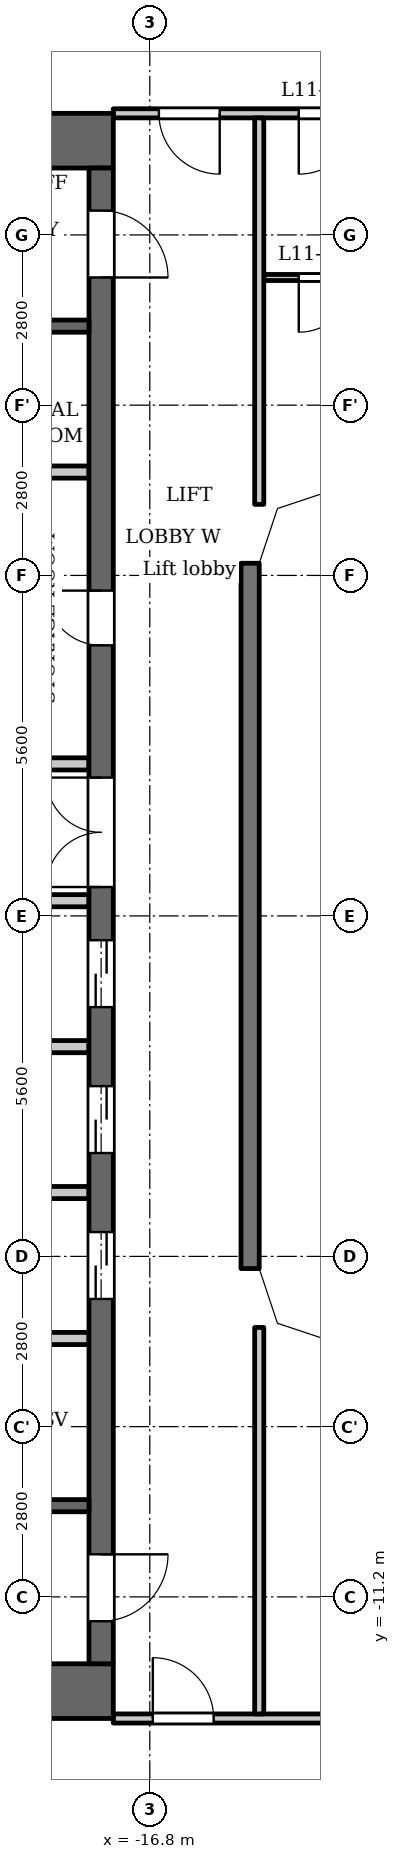
"""IFC4 building model, lengths in metres.
Left out: names, types, materials, properties, quantities, classifications, styles, units other than length and angle.
Written with IfcOpenShell. Run it as: python <this file> out.ifc"""

import sys

from ifc_helpers import new_model, si_unit, direction, frame, frame_2d, origin, place, context, subcontext, project, spatial, polyline, rectangle, outline, extrude, element, fill, save


model = new_model("IFC4")
c1 = context("Model", 3, precision=1e-05, world=origin(), true_north=direction((0.0, 1.0)))
c2 = subcontext(c1, "Body", "Model", "MODEL_VIEW")
j1 = project(units=[si_unit("LENGTHUNIT", "METRE"), si_unit("PLANEANGLEUNIT", "RADIAN")], contexts=[c1])
p1 = place(None, origin())
s1 = spatial("IfcSite", under=j1, at=p1, CompositionType="ELEMENT")
p2 = place(p1, origin())
s2 = spatial("IfcBuilding", under=s1, at=p2, CompositionType="ELEMENT")
p3 = place(p2, frame((0.0, 0.0, 48.0)))
s3 = spatial("IfcBuildingStorey", under=s2, at=p3, CompositionType="ELEMENT", Elevation=48.0)
p4 = place(p3, frame((-15.15, -5.8, 0.0), z_axis=(0.0, 0.0, 1.0), x_axis=(0.0, 1.0, 0.0)))
e1 = element("IfcWall", 1, at=p4, inside=s3, PredefinedType="SOLIDWALL", context=c2, shape_type="SweptSolid", body=[
    extrude(rectangle(XDim=11.6, YDim=0.3, at=frame_2d((5.8, 0.0))), origin(), (0.0, 0.0, 1.0), 3.2),
])
for number, where, z_axis, x_axis in (
    (2, (-17.4, 12.75, 0.0), (0.0, 0.0, 1.0), (-1.0, 0.0, 0.0)),
    (3, (-17.4, -12.75, 0.0), (0.0, 0.0, 1.0), (-1.0, 0.0, 0.0)),
):
    element("IfcWall", number, at=place(p3, frame(where, z_axis=z_axis, x_axis=x_axis)), inside=s3, PredefinedType="SHEAR", context=c2, shape_type="SweptSolid", body=[
        extrude(rectangle(XDim=10.4, YDim=0.9, at=frame_2d((5.2, 0.0))), origin(), (0.0, 0.0, 1.0), 3.2),
    ])
p5 = place(p3, frame((-17.6, -12.3, 0.0), z_axis=(0.0, 0.0, 1.0), x_axis=(0.0, 1.0, 0.0)))
e4 = element("IfcWall", 4, at=p5, inside=s3, PredefinedType="SHEAR", context=c2, shape_type="SweptSolid", body=[
    extrude(rectangle(XDim=24.6, YDim=0.4, at=frame_2d((12.3, 0.0))), origin(), (0.0, 0.0, 1.0), 3.2),
])
p6 = place(p5, frame((6.0, 0.0, 0.0)))
e5 = element("IfcOpeningElement", 5, at=p6, cuts=e4, PredefinedType="OPENING", context=c2, shape_type="SweptSolid", body=[
    extrude(rectangle(XDim=1.1, YDim=2.1, at=frame_2d((0.55, 1.05))), frame((0.0, 0.21, 0.0), z_axis=(0.0, -1.0, 0.0), x_axis=(1.0, 0.0, 0.0)), (0.0, 0.0, 1.0), 0.42),
])
p7 = place(p5, frame((8.4, 0.0, 0.0)))
e6 = element("IfcOpeningElement", 6, at=p7, cuts=e4, PredefinedType="OPENING", context=c2, shape_type="SweptSolid", body=[
    extrude(rectangle(XDim=1.1, YDim=2.1, at=frame_2d((0.55, 1.05))), frame((0.0, 0.21, 0.0), z_axis=(0.0, -1.0, 0.0), x_axis=(1.0, 0.0, 0.0)), (0.0, 0.0, 1.0), 0.42),
])
p8 = place(p5, frame((10.8, 0.0, 0.0)))
e7 = element("IfcOpeningElement", 7, at=p8, cuts=e4, PredefinedType="OPENING", context=c2, shape_type="SweptSolid", body=[
    extrude(rectangle(XDim=1.1, YDim=2.1, at=frame_2d((0.55, 1.05))), frame((0.0, 0.21, 0.0), z_axis=(0.0, -1.0, 0.0), x_axis=(1.0, 0.0, 0.0)), (0.0, 0.0, 1.0), 0.42),
])
p9 = place(p5, frame((16.75, 0.0, 0.0)))
e8 = element("IfcOpeningElement", 8, at=p9, cuts=e4, PredefinedType="OPENING", context=c2, shape_type="SweptSolid", body=[
    extrude(rectangle(XDim=0.9, YDim=2.1, at=frame_2d((0.45, 1.05))), frame((0.0, 0.21, 0.0), z_axis=(0.0, -1.0, 0.0), x_axis=(1.0, 0.0, 0.0)), (0.0, 0.0, 1.0), 0.42),
])
p10 = place(p5, frame((22.8, 0.0, 0.0)))
e9 = element("IfcOpeningElement", 9, at=p10, cuts=e4, PredefinedType="OPENING", context=c2, shape_type="SweptSolid", body=[
    extrude(rectangle(XDim=1.1, YDim=2.1, at=frame_2d((0.55, 1.05))), frame((0.0, 0.21, 0.0), z_axis=(0.0, -1.0, 0.0), x_axis=(1.0, 0.0, 0.0)), (0.0, 0.0, 1.0), 0.42),
])
p11 = place(p5, frame((0.7, 0.0, 0.0)))
e10 = element("IfcOpeningElement", 10, at=p11, cuts=e4, PredefinedType="OPENING", context=c2, shape_type="SweptSolid", body=[
    extrude(rectangle(XDim=1.1, YDim=2.1, at=frame_2d((0.55, 1.05))), frame((0.0, 0.21, 0.0), z_axis=(0.0, -1.0, 0.0), x_axis=(1.0, 0.0, 0.0)), (0.0, 0.0, 1.0), 0.42),
])
p12 = place(p5, frame((12.775, 0.0, 0.0)))
e11 = element("IfcOpeningElement", 11, at=p12, cuts=e4, PredefinedType="OPENING", context=c2, shape_type="SweptSolid", body=[
    extrude(rectangle(XDim=1.8, YDim=2.1, at=frame_2d((0.9, 1.05))), frame((0.0, 0.21, 0.0), z_axis=(0.0, -1.0, 0.0), x_axis=(1.0, 0.0, 0.0)), (0.0, 0.0, 1.0), 0.42),
])
p13 = place(p3, frame((-17.8, -9.7, 0.0), z_axis=(0.0, 0.0, 1.0), x_axis=(-1.0, 0.0, 0.0)))
e12 = element("IfcWall", 12, at=p13, inside=s3, PredefinedType="SHEAR", context=c2, shape_type="SweptSolid", body=[
    extrude(rectangle(XDim=8.3, YDim=0.2, at=frame_2d((4.15, 0.0))), origin(), (0.0, 0.0, 1.0), 3.2),
])
p14 = place(p13, frame((0.85, 0.0, 0.0)))
e13 = element("IfcOpeningElement", 13, at=p14, cuts=e12, PredefinedType="OPENING", context=c2, shape_type="SweptSolid", body=[
    extrude(rectangle(XDim=1.1, YDim=2.1, at=frame_2d((0.55, 1.05))), frame((0.0, 0.11, 0.0), z_axis=(0.0, -1.0, 0.0), x_axis=(1.0, 0.0, 0.0)), (0.0, 0.0, 1.0), 0.22),
])
p15 = place(p13, frame((3.75, 0.0, 0.0)))
e14 = element("IfcOpeningElement", 14, at=p15, cuts=e12, PredefinedType="OPENING", context=c2, shape_type="SweptSolid", body=[
    extrude(rectangle(XDim=1.1, YDim=2.1, at=frame_2d((0.55, 1.05))), frame((0.0, 0.11, 0.0), z_axis=(0.0, -1.0, 0.0), x_axis=(1.0, 0.0, 0.0)), (0.0, 0.0, 1.0), 0.22),
])
for number, where, z_axis, x_axis in (
    (15, (-17.8, -6.95, 0.0), (0.0, 0.0, 1.0), (-1.0, 0.0, 0.0)),
    (16, (-17.8, -4.55, 0.0), (0.0, 0.0, 1.0), (-1.0, 0.0, 0.0)),
    (17, (-17.8, -2.15, 0.0), (0.0, 0.0, 1.0), (-1.0, 0.0, 0.0)),
):
    element("IfcWall", number, at=place(p3, frame(where, z_axis=z_axis, x_axis=x_axis)), inside=s3, PredefinedType="PARTITIONING", context=c2, shape_type="SweptSolid", body=[
        extrude(rectangle(XDim=2.8, YDim=0.2, at=frame_2d((1.4, 0.0))), origin(), (0.0, 0.0, 1.0), 3.2),
    ])
p16 = place(p3, frame((-17.8, 0.25, 0.0), z_axis=(0.0, 0.0, 1.0), x_axis=(-1.0, 0.0, 0.0)))
e18 = element("IfcWall", 18, at=p16, inside=s3, PredefinedType="PARTITIONING", context=c2, shape_type="SweptSolid", body=[
    extrude(rectangle(XDim=3.0, YDim=0.2, at=frame_2d((1.5, 0.0))), origin(), (0.0, 0.0, 1.0), 3.2),
])
p17 = place(p3, frame((-17.8, 2.5, 0.0), z_axis=(0.0, 0.0, 1.0), x_axis=(-1.0, 0.0, 0.0)))
e19 = element("IfcWall", 19, at=p17, inside=s3, PredefinedType="PARTITIONING", context=c2, shape_type="SweptSolid", body=[
    extrude(rectangle(XDim=3.0, YDim=0.2, at=frame_2d((1.5, 0.0))), origin(), (0.0, 0.0, 1.0), 3.2),
])
p18 = place(p17, frame((1.7, 0.0, 0.0)))
e20 = element("IfcOpeningElement", 20, at=p18, cuts=e19, PredefinedType="OPENING", context=c2, shape_type="SweptSolid", body=[
    extrude(rectangle(XDim=0.9, YDim=2.1, at=frame_2d((0.45, 1.05))), frame((0.0, 0.11, 0.0), z_axis=(0.0, -1.0, 0.0), x_axis=(1.0, 0.0, 0.0)), (0.0, 0.0, 1.0), 0.22),
])
p19 = place(p3, frame((-17.8, 7.3, 0.0), z_axis=(0.0, 0.0, 1.0), x_axis=(-1.0, 0.0, 0.0)))
e21 = element("IfcWall", 21, at=p19, inside=s3, PredefinedType="PARTITIONING", context=c2, shape_type="SweptSolid", body=[
    extrude(rectangle(XDim=2.8, YDim=0.2, at=frame_2d((1.4, 0.0))), origin(), (0.0, 0.0, 1.0), 3.2),
])
p20 = place(p3, frame((-17.8, 9.7, 0.0), z_axis=(0.0, 0.0, 1.0), x_axis=(-1.0, 0.0, 0.0)))
e22 = element("IfcWall", 22, at=p20, inside=s3, PredefinedType="SHEAR", context=c2, shape_type="SweptSolid", body=[
    extrude(rectangle(XDim=8.3, YDim=0.2, at=frame_2d((4.15, 0.0))), origin(), (0.0, 0.0, 1.0), 3.2),
])
p21 = place(p20, frame((0.85, 0.0, 0.0)))
e23 = element("IfcOpeningElement", 23, at=p21, cuts=e22, PredefinedType="OPENING", context=c2, shape_type="SweptSolid", body=[
    extrude(rectangle(XDim=1.1, YDim=2.1, at=frame_2d((0.55, 1.05))), frame((0.0, 0.11, 0.0), z_axis=(0.0, -1.0, 0.0), x_axis=(1.0, 0.0, 0.0)), (0.0, 0.0, 1.0), 0.22),
])
p22 = place(p20, frame((3.75, 0.0, 0.0)))
e24 = element("IfcOpeningElement", 24, at=p22, cuts=e22, PredefinedType="OPENING", context=c2, shape_type="SweptSolid", body=[
    extrude(rectangle(XDim=1.1, YDim=2.1, at=frame_2d((0.55, 1.05))), frame((0.0, 0.11, 0.0), z_axis=(0.0, -1.0, 0.0), x_axis=(1.0, 0.0, 0.0)), (0.0, 0.0, 1.0), 0.22),
])
p23 = place(p3, frame((-17.4, -13.2, 0.0), z_axis=(0.0, 0.0, 1.0), x_axis=(1.0, 0.0, 0.0)))
e25 = element("IfcWall", 25, at=p23, inside=s3, PredefinedType="PARTITIONING", context=c2, shape_type="SweptSolid", body=[
    extrude(rectangle(XDim=34.8, YDim=0.15, at=frame_2d((17.4, 0.0))), origin(), (0.0, 0.0, 1.0), 3.2),
])
p24 = place(p23, frame((0.65, 0.0, 0.0)))
e26 = element("IfcOpeningElement", 26, at=p24, cuts=e25, PredefinedType="OPENING", context=c2, shape_type="SweptSolid", body=[
    extrude(rectangle(XDim=1.0, YDim=2.1, at=frame_2d((0.5, 1.05))), frame((0.0, 0.085, 0.0), z_axis=(0.0, -1.0, 0.0), x_axis=(1.0, 0.0, 0.0)), (0.0, 0.0, 1.0), 0.17),
])
p25 = place(p23, frame((33.05, 0.0, 0.0)))
e27 = element("IfcOpeningElement", 27, at=p25, cuts=e25, PredefinedType="OPENING", context=c2, shape_type="SweptSolid", body=[
    extrude(rectangle(XDim=1.0, YDim=2.1, at=frame_2d((0.5, 1.05))), frame((0.0, 0.085, 0.0), z_axis=(0.0, -1.0, 0.0), x_axis=(1.0, 0.0, 0.0)), (0.0, 0.0, 1.0), 0.17),
])
p26 = place(p23, frame((4.55, 0.0, 0.0)))
e28 = element("IfcOpeningElement", 28, at=p26, cuts=e25, PredefinedType="OPENING", context=c2, shape_type="SweptSolid", body=[
    extrude(rectangle(XDim=1.0, YDim=2.1, at=frame_2d((0.5, 1.05))), frame((0.0, 0.085, 0.0), z_axis=(0.0, -1.0, 0.0), x_axis=(1.0, 0.0, 0.0)), (0.0, 0.0, 1.0), 0.17),
])
p27 = place(p23, frame((6.9, 0.0, 0.0)))
e29 = element("IfcOpeningElement", 29, at=p27, cuts=e25, PredefinedType="OPENING", context=c2, shape_type="SweptSolid", body=[
    extrude(rectangle(XDim=1.0, YDim=2.1, at=frame_2d((0.5, 1.05))), frame((0.0, 0.085, 0.0), z_axis=(0.0, -1.0, 0.0), x_axis=(1.0, 0.0, 0.0)), (0.0, 0.0, 1.0), 0.17),
])
p28 = place(p23, frame((15.75, 0.0, 0.0)))
e30 = element("IfcOpeningElement", 30, at=p28, cuts=e25, PredefinedType="OPENING", context=c2, shape_type="SweptSolid", body=[
    extrude(rectangle(XDim=1.0, YDim=2.1, at=frame_2d((0.5, 1.05))), frame((0.0, 0.085, 0.0), z_axis=(0.0, -1.0, 0.0), x_axis=(1.0, 0.0, 0.0)), (0.0, 0.0, 1.0), 0.17),
])
p29 = place(p23, frame((18.1, 0.0, 0.0)))
e31 = element("IfcOpeningElement", 31, at=p29, cuts=e25, PredefinedType="OPENING", context=c2, shape_type="SweptSolid", body=[
    extrude(rectangle(XDim=1.0, YDim=2.1, at=frame_2d((0.5, 1.05))), frame((0.0, 0.085, 0.0), z_axis=(0.0, -1.0, 0.0), x_axis=(1.0, 0.0, 0.0)), (0.0, 0.0, 1.0), 0.17),
])
p30 = place(p23, frame((26.95, 0.0, 0.0)))
e32 = element("IfcOpeningElement", 32, at=p30, cuts=e25, PredefinedType="OPENING", context=c2, shape_type="SweptSolid", body=[
    extrude(rectangle(XDim=1.0, YDim=2.1, at=frame_2d((0.5, 1.05))), frame((0.0, 0.085, 0.0), z_axis=(0.0, -1.0, 0.0), x_axis=(1.0, 0.0, 0.0)), (0.0, 0.0, 1.0), 0.17),
])
p31 = place(p23, frame((29.25, 0.0, 0.0)))
e33 = element("IfcOpeningElement", 33, at=p31, cuts=e25, PredefinedType="OPENING", context=c2, shape_type="SweptSolid", body=[
    extrude(rectangle(XDim=1.0, YDim=2.1, at=frame_2d((0.5, 1.05))), frame((0.0, 0.085, 0.0), z_axis=(0.0, -1.0, 0.0), x_axis=(1.0, 0.0, 0.0)), (0.0, 0.0, 1.0), 0.17),
])
p32 = place(p3, frame((-14.925, 10.5, 0.0), z_axis=(0.0, 0.0, 1.0), x_axis=(1.0, 0.0, 0.0)))
e34 = element("IfcWall", 34, at=p32, inside=s3, PredefinedType="PARTITIONING", context=c2, shape_type="SweptSolid", body=[
    extrude(rectangle(XDim=29.85, YDim=0.1, at=frame_2d((14.925, 0.0))), origin(), (0.0, 0.0, 1.0), 3.2),
])
p33 = place(p32, frame((4.375, 0.0, 0.0)))
e35 = element("IfcOpeningElement", 35, at=p33, cuts=e34, PredefinedType="OPENING", context=c2, shape_type="SweptSolid", body=[
    extrude(rectangle(XDim=0.8, YDim=2.1, at=frame_2d((0.4, 1.05))), frame((0.0, 0.06, 0.0), z_axis=(0.0, -1.0, 0.0), x_axis=(1.0, 0.0, 0.0)), (0.0, 0.0, 1.0), 0.12),
])
p34 = place(p32, frame((0.575, 0.0, 0.0)))
e36 = element("IfcOpeningElement", 36, at=p34, cuts=e34, PredefinedType="OPENING", context=c2, shape_type="SweptSolid", body=[
    extrude(rectangle(XDim=0.9, YDim=2.1, at=frame_2d((0.45, 1.05))), frame((0.0, 0.06, 0.0), z_axis=(0.0, -1.0, 0.0), x_axis=(1.0, 0.0, 0.0)), (0.0, 0.0, 1.0), 0.12),
])
p35 = place(p32, frame((13.475, 0.0, 0.0)))
e37 = element("IfcOpeningElement", 37, at=p35, cuts=e34, PredefinedType="OPENING", context=c2, shape_type="SweptSolid", body=[
    extrude(rectangle(XDim=0.8, YDim=2.1, at=frame_2d((0.4, 1.05))), frame((0.0, 0.06, 0.0), z_axis=(0.0, -1.0, 0.0), x_axis=(1.0, 0.0, 0.0)), (0.0, 0.0, 1.0), 0.12),
])
p36 = place(p32, frame((9.975, 0.0, 0.0)))
e38 = element("IfcOpeningElement", 38, at=p36, cuts=e34, PredefinedType="OPENING", context=c2, shape_type="SweptSolid", body=[
    extrude(rectangle(XDim=0.9, YDim=2.1, at=frame_2d((0.45, 1.05))), frame((0.0, 0.06, 0.0), z_axis=(0.0, -1.0, 0.0), x_axis=(1.0, 0.0, 0.0)), (0.0, 0.0, 1.0), 0.12),
])
p37 = place(p32, frame((19.075, 0.0, 0.0)))
e39 = element("IfcOpeningElement", 39, at=p37, cuts=e34, PredefinedType="OPENING", context=c2, shape_type="SweptSolid", body=[
    extrude(rectangle(XDim=0.8, YDim=2.1, at=frame_2d((0.4, 1.05))), frame((0.0, 0.06, 0.0), z_axis=(0.0, -1.0, 0.0), x_axis=(1.0, 0.0, 0.0)), (0.0, 0.0, 1.0), 0.12),
])
p38 = place(p32, frame((16.075, 0.0, 0.0)))
e40 = element("IfcOpeningElement", 40, at=p38, cuts=e34, PredefinedType="OPENING", context=c2, shape_type="SweptSolid", body=[
    extrude(rectangle(XDim=0.9, YDim=2.1, at=frame_2d((0.45, 1.05))), frame((0.0, 0.06, 0.0), z_axis=(0.0, -1.0, 0.0), x_axis=(1.0, 0.0, 0.0)), (0.0, 0.0, 1.0), 0.12),
])
p39 = place(p32, frame((21.175, 0.0, 0.0)))
e41 = element("IfcOpeningElement", 41, at=p39, cuts=e34, PredefinedType="OPENING", context=c2, shape_type="SweptSolid", body=[
    extrude(rectangle(XDim=0.8, YDim=2.1, at=frame_2d((0.4, 1.05))), frame((0.0, 0.06, 0.0), z_axis=(0.0, -1.0, 0.0), x_axis=(1.0, 0.0, 0.0)), (0.0, 0.0, 1.0), 0.12),
])
p40 = place(p32, frame((26.775, 0.0, 0.0)))
e42 = element("IfcOpeningElement", 42, at=p40, cuts=e34, PredefinedType="OPENING", context=c2, shape_type="SweptSolid", body=[
    extrude(rectangle(XDim=0.9, YDim=2.1, at=frame_2d((0.45, 1.05))), frame((0.0, 0.06, 0.0), z_axis=(0.0, -1.0, 0.0), x_axis=(1.0, 0.0, 0.0)), (0.0, 0.0, 1.0), 0.12),
])
p41 = place(p3, frame((-17.4, 13.2, 0.0), z_axis=(0.0, 0.0, 1.0), x_axis=(1.0, 0.0, 0.0)))
e43 = element("IfcWall", 43, at=p41, inside=s3, PredefinedType="PARTITIONING", context=c2, shape_type="SweptSolid", body=[
    extrude(rectangle(XDim=34.8, YDim=0.15, at=frame_2d((17.4, 0.0))), origin(), (0.0, 0.0, 1.0), 3.2),
])
p42 = place(p41, frame((0.75, 0.0, 0.0)))
e44 = element("IfcOpeningElement", 44, at=p42, cuts=e43, PredefinedType="OPENING", context=c2, shape_type="SweptSolid", body=[
    extrude(rectangle(XDim=1.0, YDim=2.1, at=frame_2d((0.5, 1.05))), frame((0.0, 0.085, 0.0), z_axis=(0.0, -1.0, 0.0), x_axis=(1.0, 0.0, 0.0)), (0.0, 0.0, 1.0), 0.17),
])
p43 = place(p41, frame((33.15, 0.0, 0.0)))
e45 = element("IfcOpeningElement", 45, at=p43, cuts=e43, PredefinedType="OPENING", context=c2, shape_type="SweptSolid", body=[
    extrude(rectangle(XDim=1.0, YDim=2.1, at=frame_2d((0.5, 1.05))), frame((0.0, 0.085, 0.0), z_axis=(0.0, -1.0, 0.0), x_axis=(1.0, 0.0, 0.0)), (0.0, 0.0, 1.0), 0.17),
])
p44 = place(p41, frame((3.05, 0.0, 0.0)))
e46 = element("IfcOpeningElement", 46, at=p44, cuts=e43, PredefinedType="OPENING", context=c2, shape_type="SweptSolid", body=[
    extrude(rectangle(XDim=1.0, YDim=2.1, at=frame_2d((0.5, 1.05))), frame((0.0, 0.085, 0.0), z_axis=(0.0, -1.0, 0.0), x_axis=(1.0, 0.0, 0.0)), (0.0, 0.0, 1.0), 0.17),
])
p45 = place(p41, frame((12.45, 0.0, 0.0)))
e47 = element("IfcOpeningElement", 47, at=p45, cuts=e43, PredefinedType="OPENING", context=c2, shape_type="SweptSolid", body=[
    extrude(rectangle(XDim=1.0, YDim=2.1, at=frame_2d((0.5, 1.05))), frame((0.0, 0.085, 0.0), z_axis=(0.0, -1.0, 0.0), x_axis=(1.0, 0.0, 0.0)), (0.0, 0.0, 1.0), 0.17),
])
p46 = place(p41, frame((18.3, 0.0, 0.0)))
e48 = element("IfcOpeningElement", 48, at=p46, cuts=e43, PredefinedType="OPENING", context=c2, shape_type="SweptSolid", body=[
    extrude(rectangle(XDim=1.0, YDim=2.1, at=frame_2d((0.5, 1.05))), frame((0.0, 0.085, 0.0), z_axis=(0.0, -1.0, 0.0), x_axis=(1.0, 0.0, 0.0)), (0.0, 0.0, 1.0), 0.17),
])
p47 = place(p41, frame((29.25, 0.0, 0.0)))
e49 = element("IfcOpeningElement", 49, at=p47, cuts=e43, PredefinedType="OPENING", context=c2, shape_type="SweptSolid", body=[
    extrude(rectangle(XDim=1.0, YDim=2.1, at=frame_2d((0.5, 1.05))), frame((0.0, 0.085, 0.0), z_axis=(0.0, -1.0, 0.0), x_axis=(1.0, 0.0, 0.0)), (0.0, 0.0, 1.0), 0.17),
])
for number, where, z_axis, x_axis in (
    (50, (-15.0, -13.125, 0.0), (0.0, 0.0, 1.0), (0.0, 1.0, 0.0)),
    (51, (-15.0, 6.769, 0.0), (0.0, 0.0, 1.0), (0.0, 1.0, 0.0)),
):
    element("IfcWall", number, at=place(p3, frame(where, z_axis=z_axis, x_axis=x_axis)), inside=s3, PredefinedType="PARTITIONING", context=c2, shape_type="SweptSolid", body=[
        extrude(rectangle(XDim=6.356, YDim=0.15, at=frame_2d((3.178, 0.0))), origin(), (0.0, 0.0, 1.0), 3.2),
    ])
p48 = place(p3, origin())
e52 = element("IfcWall", 52, at=p48, inside=s3, PredefinedType="SOLIDWALL", context=c2, shape_type="SweptSolid", body=[
    extrude(outline(polyline([(-13.849, 7.3), (-14.937, 6.937), (-15.3, 5.849), (-15.3, 5.8), (-15.0, 5.8), (-14.7, 6.7), (-13.8, 7.0), (-13.8, 7.3), (-13.849, 7.3)])), origin(), (0.0, 0.0, 1.0), 3.2),
])
e53 = element("IfcWall", 53, at=p48, inside=s3, PredefinedType="SOLIDWALL", context=c2, shape_type="SweptSolid", body=[
    extrude(outline(polyline([(-14.937, -6.937), (-13.849, -7.3), (-13.8, -7.3), (-13.8, -7.0), (-14.7, -6.7), (-15.0, -5.8), (-15.3, -5.8), (-15.3, -5.849), (-14.937, -6.937)])), origin(), (0.0, 0.0, 1.0), 3.2),
])
p49 = place(p6, origin())
e54 = element("IfcDoor", 54, at=p49, inside=s3, OperationType="DOUBLE_DOOR_SLIDING", PredefinedType="DOOR", context=c2, shape_type="SweptSolid", body=[
    extrude(rectangle(XDim=1.1, YDim=2.1, at=frame_2d((0.55, 1.05))), frame((0.0, 0.025, 0.0), z_axis=(0.0, -1.0, 0.0), x_axis=(1.0, 0.0, 0.0)), (0.0, 0.0, 1.0), 0.05),
])
fill(e5, e54)
p50 = place(p7, origin())
e55 = element("IfcDoor", 55, at=p50, inside=s3, OperationType="DOUBLE_DOOR_SLIDING", PredefinedType="DOOR", context=c2, shape_type="SweptSolid", body=[
    extrude(rectangle(XDim=1.1, YDim=2.1, at=frame_2d((0.55, 1.05))), frame((0.0, 0.025, 0.0), z_axis=(0.0, -1.0, 0.0), x_axis=(1.0, 0.0, 0.0)), (0.0, 0.0, 1.0), 0.05),
])
fill(e6, e55)
p51 = place(p8, origin())
e56 = element("IfcDoor", 56, at=p51, inside=s3, OperationType="DOUBLE_DOOR_SLIDING", PredefinedType="DOOR", context=c2, shape_type="SweptSolid", body=[
    extrude(rectangle(XDim=1.1, YDim=2.1, at=frame_2d((0.55, 1.05))), frame((0.0, 0.025, 0.0), z_axis=(0.0, -1.0, 0.0), x_axis=(1.0, 0.0, 0.0)), (0.0, 0.0, 1.0), 0.05),
])
fill(e7, e56)
p52 = place(p9, origin())
e57 = element("IfcDoor", 57, at=p52, inside=s3, OperationType="SINGLE_SWING_LEFT", PredefinedType="DOOR", context=c2, shape_type="SweptSolid", body=[
    extrude(rectangle(XDim=0.9, YDim=2.1, at=frame_2d((0.45, 1.05))), frame((0.0, 0.025, 0.0), z_axis=(0.0, -1.0, 0.0), x_axis=(1.0, 0.0, 0.0)), (0.0, 0.0, 1.0), 0.05),
])
fill(e8, e57)
p53 = place(p10, origin())
e58 = element("IfcDoor", 58, at=p53, inside=s3, OperationType="SINGLE_SWING_LEFT", PredefinedType="DOOR", context=c2, shape_type="SweptSolid", body=[
    extrude(rectangle(XDim=1.1, YDim=2.1, at=frame_2d((0.55, 1.05))), frame((0.0, 0.025, 0.0), z_axis=(0.0, -1.0, 0.0), x_axis=(1.0, 0.0, 0.0)), (0.0, 0.0, 1.0), 0.05),
])
fill(e9, e58)
p54 = place(p11, origin())
e59 = element("IfcDoor", 59, at=p54, inside=s3, OperationType="SINGLE_SWING_RIGHT", PredefinedType="DOOR", context=c2, shape_type="SweptSolid", body=[
    extrude(rectangle(XDim=1.1, YDim=2.1, at=frame_2d((0.55, 1.05))), frame((0.0, 0.025, 0.0), z_axis=(0.0, -1.0, 0.0), x_axis=(1.0, 0.0, 0.0)), (0.0, 0.0, 1.0), 0.05),
])
fill(e10, e59)
p55 = place(p12, origin())
e60 = element("IfcDoor", 60, at=p55, inside=s3, OperationType="DOUBLE_DOOR_SINGLE_SWING", PredefinedType="DOOR", context=c2, shape_type="SweptSolid", body=[
    extrude(rectangle(XDim=1.8, YDim=2.1, at=frame_2d((0.9, 1.05))), frame((0.0, 0.025, 0.0), z_axis=(0.0, -1.0, 0.0), x_axis=(1.0, 0.0, 0.0)), (0.0, 0.0, 1.0), 0.05),
])
fill(e11, e60)
p56 = place(p42, origin())
e61 = element("IfcDoor", 61, at=p56, inside=s3, OperationType="SINGLE_SWING_RIGHT", PredefinedType="DOOR", context=c2, shape_type="SweptSolid", body=[
    extrude(rectangle(XDim=1.0, YDim=2.1, at=frame_2d((0.5, 1.05))), frame((0.0, 0.025, 0.0), z_axis=(0.0, -1.0, 0.0), x_axis=(1.0, 0.0, 0.0)), (0.0, 0.0, 1.0), 0.05),
])
fill(e44, e61)
p57 = place(p24, origin())
e62 = element("IfcDoor", 62, at=p57, inside=s3, OperationType="SINGLE_SWING_RIGHT", PredefinedType="DOOR", context=c2, shape_type="SweptSolid", body=[
    extrude(rectangle(XDim=1.0, YDim=2.1, at=frame_2d((0.5, 1.05))), frame((0.0, 0.025, 0.0), z_axis=(0.0, -1.0, 0.0), x_axis=(1.0, 0.0, 0.0)), (0.0, 0.0, 1.0), 0.05),
])
fill(e26, e62)
p58 = place(p44, origin())
e63 = element("IfcDoor", 63, at=p58, inside=s3, OperationType="SINGLE_SWING_LEFT", PredefinedType="DOOR", context=c2, shape_type="SweptSolid", body=[
    extrude(rectangle(XDim=1.0, YDim=2.1, at=frame_2d((0.5, 1.05))), frame((0.0, 0.025, 0.0), z_axis=(0.0, -1.0, 0.0), x_axis=(1.0, 0.0, 0.0)), (0.0, 0.0, 1.0), 0.05),
])
fill(e46, e63)
p59 = place(p34, origin())
e64 = element("IfcDoor", 64, at=p59, inside=s3, OperationType="SINGLE_SWING_LEFT", PredefinedType="DOOR", context=c2, shape_type="SweptSolid", body=[
    extrude(rectangle(XDim=0.9, YDim=2.1, at=frame_2d((0.45, 1.05))), frame((0.0, 0.025, 0.0), z_axis=(0.0, -1.0, 0.0), x_axis=(1.0, 0.0, 0.0)), (0.0, 0.0, 1.0), 0.05),
])
fill(e36, e64)
save(model, sys.argv[1])
